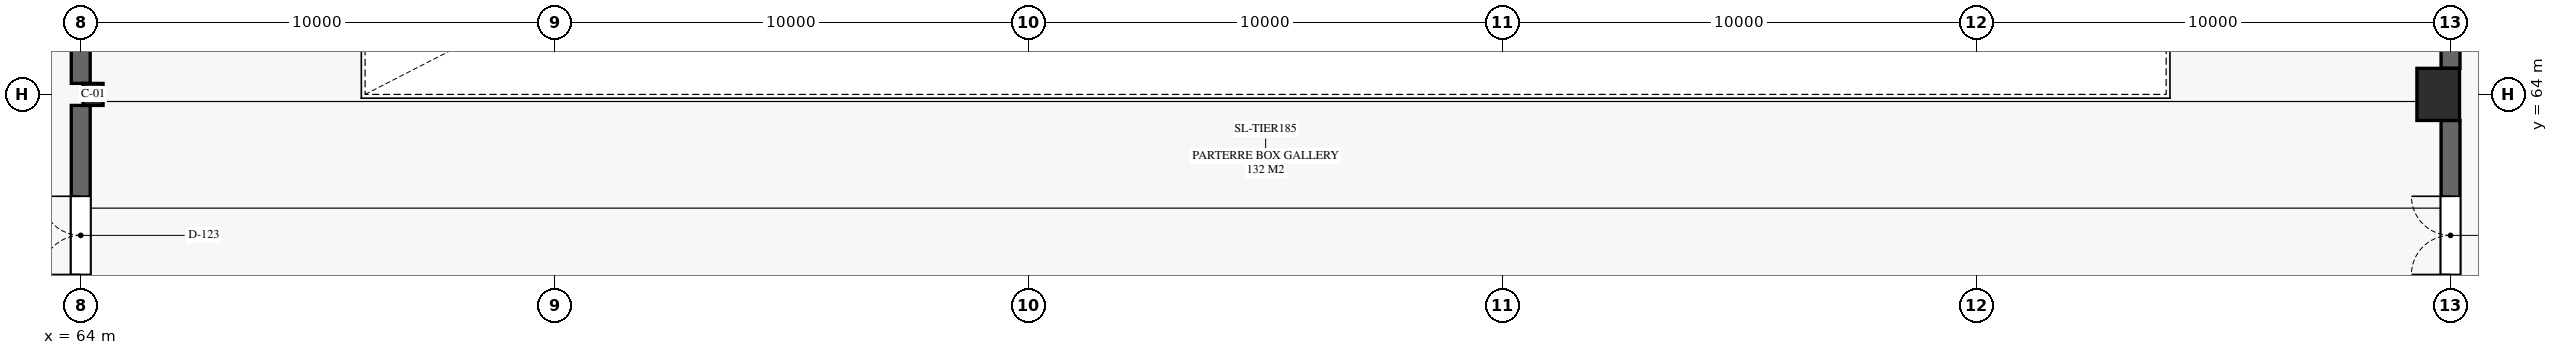
"""IFC4 building model, lengths in metres.
Left out: names, types, materials, properties, quantities, classifications, styles, units other than length and angle.
Written with IfcOpenShell. Run it as: python <this file> out.ifc"""

import sys

from ifc_helpers import new_model, si_unit, direction, frame, frame_2d, origin, origin_2d, place, context, subcontext, project, spatial, rectangle, i_section, extrude, element, fill, save


model = new_model("IFC4")
c1 = context("Model", 3, precision=1e-05, world=origin(), true_north=direction((0.0, 1.0)))
c2 = subcontext(c1, "Body", "Model", "MODEL_VIEW")
j1 = project(units=[si_unit("LENGTHUNIT", "METRE"), si_unit("PLANEANGLEUNIT", "RADIAN")], contexts=[c1])
p1 = place(None, origin())
s1 = spatial("IfcSite", under=j1, at=p1, CompositionType="ELEMENT")
p2 = place(p1, origin())
s2 = spatial("IfcBuilding", under=s1, at=p2, CompositionType="ELEMENT")
p3 = place(p2, frame((0.0, 0.0, 5.0)))
s3 = spatial("IfcBuildingStorey", under=s2, at=p3, CompositionType="ELEMENT", Elevation=5.0)
p4 = place(p3, frame((64.26, 64.0, 0.0), z_axis=(0.0, 0.0, 1.0), x_axis=(1.0, 0.0, 0.0)))
e1 = element("IfcColumn", 1, at=p4, inside=s3, PredefinedType="COLUMN", context=c2, shape_type="SweptSolid", body=[
    extrude(i_section(OverallWidth=0.422, OverallDepth=0.465, WebThickness=0.045, FlangeThickness=0.073, FilletRadius=0.02, at=origin_2d()), origin(), (0.0, 0.0, 1.0), 5.0),
])
p5 = place(p3, frame((113.74, 64.0, 0.0), z_axis=(0.0, 0.0, 1.0), x_axis=(1.0, 0.0, 0.0)))
e2 = element("IfcColumn", 2, at=p5, inside=s3, PredefinedType="COLUMN", context=c2, shape_type="SweptSolid", body=[
    extrude(rectangle(XDim=0.9, YDim=1.1, at=origin_2d()), origin(), (0.0, 0.0, 1.0), 5.0),
])
p6 = place(p3, frame((64.0, 58.0, 0.0), z_axis=(0.0, 0.0, 1.0), x_axis=(0.0, 1.0, 0.0)))
e3 = element("IfcWall", 3, at=p6, inside=s3, PredefinedType="SHEAR", context=c2, shape_type="SweptSolid", body=[
    extrude(rectangle(XDim=5.768, YDim=0.4, at=frame_2d((2.884, 0.0))), origin(), (0.0, 0.0, 1.0), 4.675),
])
p7 = place(p6, frame((2.2, 0.0, 0.0)))
e4 = element("IfcOpeningElement", 4, at=p7, cuts=e3, PredefinedType="OPENING", context=c2, shape_type="SweptSolid", body=[
    extrude(rectangle(XDim=1.65, YDim=2.3, at=frame_2d((0.825, 1.15))), frame((0.0, 0.21, 0.0), z_axis=(0.0, -1.0, 0.0), x_axis=(1.0, 0.0, 0.0)), (0.0, 0.0, 1.0), 0.42),
])
p8 = place(p3, frame((64.0, 64.232, 0.0), z_axis=(0.0, 0.0, 1.0), x_axis=(0.0, 1.0, 0.0)))
e5 = element("IfcWall", 5, at=p8, inside=s3, PredefinedType="SHEAR", context=c2, shape_type="SweptSolid", body=[
    extrude(rectangle(XDim=3.993, YDim=0.4, at=frame_2d((1.996, 0.0))), origin(), (0.0, 0.0, 1.0), 4.675),
])
p9 = place(p3, frame((114.0, 58.0, 0.0), z_axis=(0.0, 0.0, 1.0), x_axis=(0.0, 1.0, 0.0)))
e6 = element("IfcWall", 6, at=p9, inside=s3, PredefinedType="SHEAR", context=c2, shape_type="SweptSolid", body=[
    extrude(rectangle(XDim=5.45, YDim=0.4, at=frame_2d((2.725, 0.0))), origin(), (0.0, 0.0, 1.0), 4.675),
])
p10 = place(p9, frame((2.2, 0.0, 0.0)))
e7 = element("IfcOpeningElement", 7, at=p10, cuts=e6, PredefinedType="OPENING", context=c2, shape_type="SweptSolid", body=[
    extrude(rectangle(XDim=1.65, YDim=2.3, at=frame_2d((0.825, 1.15))), frame((0.0, 0.21, 0.0), z_axis=(0.0, -1.0, 0.0), x_axis=(1.0, 0.0, 0.0)), (0.0, 0.0, 1.0), 0.42),
])
p11 = place(p3, frame((114.0, 64.55, 0.0), z_axis=(0.0, 0.0, 1.0), x_axis=(0.0, 1.0, 0.0)))
e8 = element("IfcWall", 8, at=p11, inside=s3, PredefinedType="SHEAR", context=c2, shape_type="SweptSolid", body=[
    extrude(rectangle(XDim=3.525, YDim=0.4, at=frame_2d((1.762, 0.0))), origin(), (0.0, 0.0, 1.0), 4.675),
])
p12 = place(p7, origin())
e9 = element("IfcDoor", 9, at=p12, inside=s3, OperationType="DOUBLE_DOOR_SINGLE_SWING", PredefinedType="DOOR", context=c2, shape_type="SweptSolid", body=[
    extrude(rectangle(XDim=1.65, YDim=2.3, at=frame_2d((0.825, 1.15))), frame((0.0, 0.025, 0.0), z_axis=(0.0, -1.0, 0.0), x_axis=(1.0, 0.0, 0.0)), (0.0, 0.0, 1.0), 0.05),
])
fill(e4, e9)
p13 = place(p10, origin())
e10 = element("IfcDoor", 10, at=p13, inside=s3, OperationType="DOUBLE_DOOR_SINGLE_SWING", PredefinedType="DOOR", context=c2, shape_type="SweptSolid", body=[
    extrude(rectangle(XDim=1.65, YDim=2.3, at=frame_2d((0.825, 1.15))), frame((0.0, 0.025, 0.0), z_axis=(0.0, -1.0, 0.0), x_axis=(1.0, 0.0, 0.0)), (0.0, 0.0, 1.0), 0.05),
])
fill(e7, e10)
save(model, sys.argv[1])
